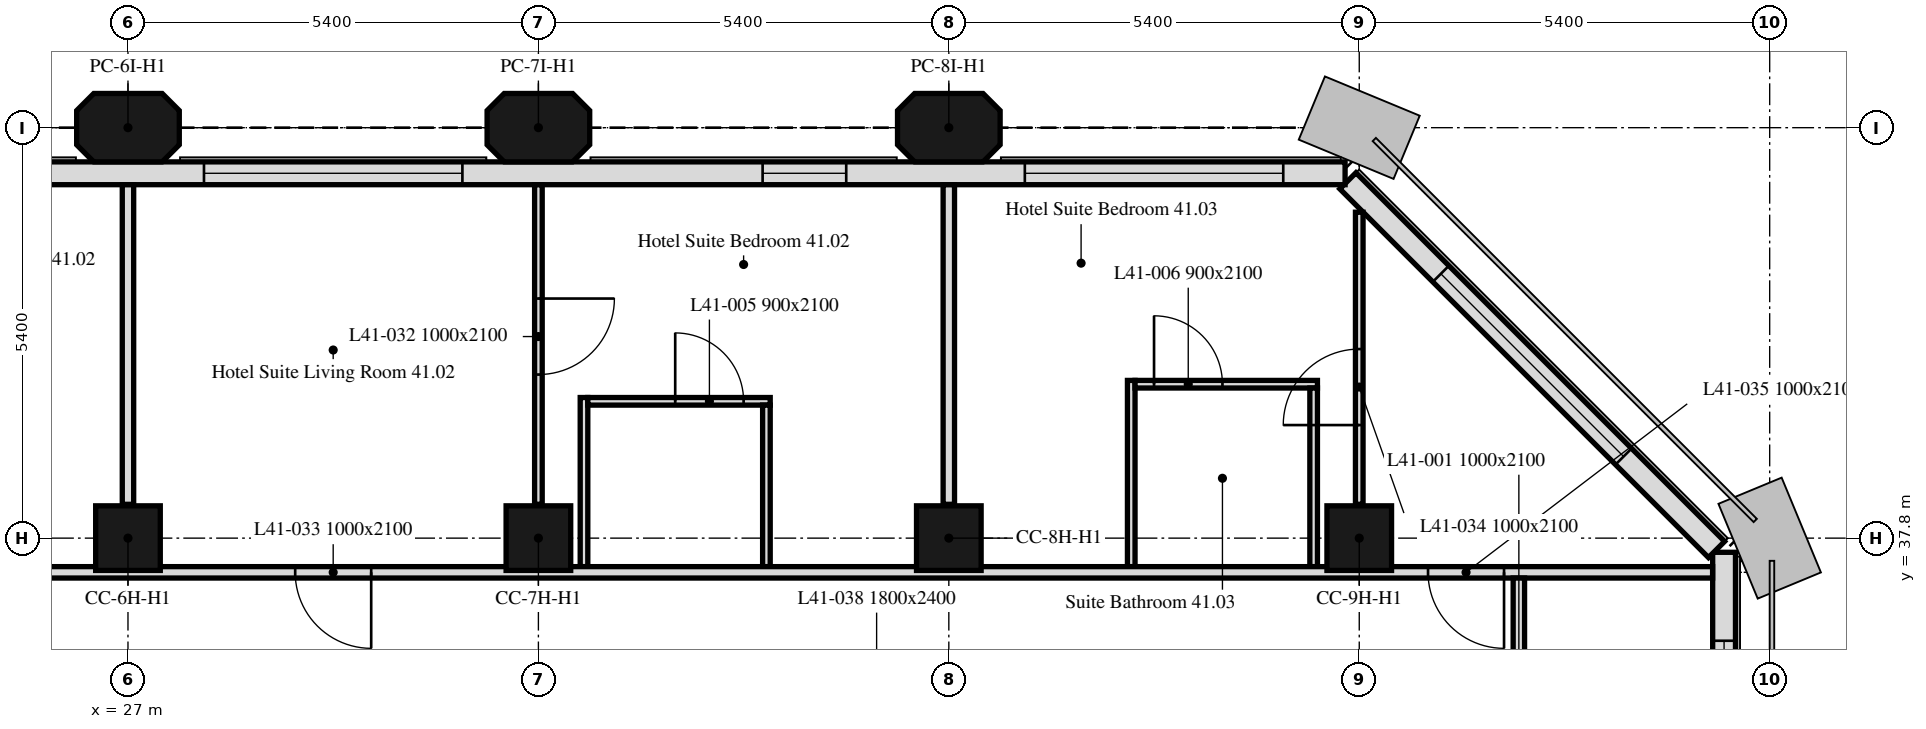
"""IFC4 building model, lengths in metres.
Left out: names, types, materials, properties, quantities, classifications, styles, units other than length and angle.
Written with IfcOpenShell. Run it as: python <this file> out.ifc"""

import sys

from ifc_helpers import new_model, si_unit, direction, frame, frame_2d, origin, origin_2d, place, context, subcontext, project, spatial, polyline, rectangle, outline, extrude, element, fill, save


model = new_model("IFC4")
c1 = context("Model", 3, precision=1e-05, world=origin(), true_north=direction((0.0, 1.0)))
c2 = subcontext(c1, "Body", "Model", "MODEL_VIEW")
j1 = project(units=[si_unit("LENGTHUNIT", "METRE"), si_unit("PLANEANGLEUNIT", "RADIAN")], contexts=[c1])
p1 = place(None, origin())
s1 = spatial("IfcSite", under=j1, at=p1, CompositionType="ELEMENT")
p2 = place(p1, origin())
s2 = spatial("IfcBuilding", under=s1, at=p2, CompositionType="ELEMENT")
p3 = place(p2, frame((0.0, 0.0, 172.6)))
s3 = spatial("IfcBuildingStorey", under=s2, at=p3, CompositionType="ELEMENT", Elevation=172.6)
for number, where, z_axis, x_axis in (
    (1, (27.0, 37.8, 0.0), (0.0, 0.0, 1.0), (1.0, 0.0, 0.0)),
    (2, (32.4, 37.8, 0.0), (0.0, 0.0, 1.0), (1.0, 0.0, 0.0)),
    (3, (37.8, 37.8, 0.0), (0.0, 0.0, 1.0), (1.0, 0.0, 0.0)),
    (4, (43.2, 37.8, 0.0), (0.0, 0.0, 1.0), (1.0, 0.0, 0.0)),
):
    element("IfcColumn", number, at=place(p3, frame(where, z_axis=z_axis, x_axis=x_axis)), inside=s3, PredefinedType="COLUMN", context=c2, shape_type="SweptSolid", body=[
        extrude(rectangle(XDim=0.85, YDim=0.85, at=origin_2d()), origin(), (0.0, 0.0, 1.0), 2.8),
    ])
for number, where, z_axis, x_axis in (
    (5, (27.0, 43.2, 0.0), (0.0, 0.0, 1.0), (1.0, 0.0, 0.0)),
    (6, (32.4, 43.2, 0.0), (0.0, 0.0, 1.0), (1.0, 0.0, 0.0)),
    (7, (37.8, 43.2, 0.0), (0.0, 0.0, 1.0), (1.0, 0.0, 0.0)),
):
    element("IfcColumn", number, at=place(p3, frame(where, z_axis=z_axis, x_axis=x_axis)), inside=s3, PredefinedType="COLUMN", context=c2, shape_type="SweptSolid", body=[
        extrude(outline(polyline([(-0.45, -0.45), (0.45, -0.45), (0.675, -0.225), (0.675, 0.225), (0.45, 0.45), (-0.45, 0.45), (-0.675, 0.225), (-0.675, -0.225), (-0.45, -0.45)])), origin(), (0.0, 0.0, 1.0), 2.8),
    ])
p4 = place(p3, frame((48.0, 5.586, 0.0), z_axis=(0.0, 0.0, 1.0), x_axis=(0.0, 1.0, 0.0)))
e8 = element("IfcWall", 8, at=p4, inside=s3, PredefinedType="SOLIDWALL", context=c2, shape_type="SweptSolid", body=[
    extrude(rectangle(XDim=32.027, YDim=0.3, at=frame_2d((16.014, 0.0))), origin(), (0.0, 0.0, 1.0), 2.8),
])
p5 = place(p4, frame((1.164, 0.0, 0.9)))
e9 = element("IfcOpeningElement", 9, at=p5, cuts=e8, PredefinedType="OPENING", context=c2, shape_type="SweptSolid", body=[
    extrude(rectangle(XDim=1.1, YDim=1.7, at=frame_2d((0.55, 0.85))), frame((0.0, 0.16, 0.0), z_axis=(0.0, -1.0, 0.0), x_axis=(1.0, 0.0, 0.0)), (0.0, 0.0, 1.0), 0.32),
])
p6 = place(p4, frame((2.764, 0.0, 0.9)))
e10 = element("IfcOpeningElement", 10, at=p6, cuts=e8, PredefinedType="OPENING", context=c2, shape_type="SweptSolid", body=[
    extrude(rectangle(XDim=1.1, YDim=1.7, at=frame_2d((0.55, 0.85))), frame((0.0, 0.16, 0.0), z_axis=(0.0, -1.0, 0.0), x_axis=(1.0, 0.0, 0.0)), (0.0, 0.0, 1.0), 0.32),
])
p7 = place(p4, frame((6.564, 0.0, 0.9)))
e11 = element("IfcOpeningElement", 11, at=p7, cuts=e8, PredefinedType="OPENING", context=c2, shape_type="SweptSolid", body=[
    extrude(rectangle(XDim=1.1, YDim=1.7, at=frame_2d((0.55, 0.85))), frame((0.0, 0.16, 0.0), z_axis=(0.0, -1.0, 0.0), x_axis=(1.0, 0.0, 0.0)), (0.0, 0.0, 1.0), 0.32),
])
p8 = place(p4, frame((8.164, 0.0, 0.9)))
e12 = element("IfcOpeningElement", 12, at=p8, cuts=e8, PredefinedType="OPENING", context=c2, shape_type="SweptSolid", body=[
    extrude(rectangle(XDim=1.1, YDim=1.7, at=frame_2d((0.55, 0.85))), frame((0.0, 0.16, 0.0), z_axis=(0.0, -1.0, 0.0), x_axis=(1.0, 0.0, 0.0)), (0.0, 0.0, 1.0), 0.32),
])
p9 = place(p4, frame((11.614, 0.0, 0.9)))
e13 = element("IfcOpeningElement", 13, at=p9, cuts=e8, PredefinedType="OPENING", context=c2, shape_type="SweptSolid", body=[
    extrude(rectangle(XDim=3.4, YDim=1.7, at=frame_2d((1.7, 0.85))), frame((0.0, 0.16, 0.0), z_axis=(0.0, -1.0, 0.0), x_axis=(1.0, 0.0, 0.0)), (0.0, 0.0, 1.0), 0.32),
])
p10 = place(p4, frame((17.364, 0.0, 0.9)))
e14 = element("IfcOpeningElement", 14, at=p10, cuts=e8, PredefinedType="OPENING", context=c2, shape_type="SweptSolid", body=[
    extrude(rectangle(XDim=1.1, YDim=1.7, at=frame_2d((0.55, 0.85))), frame((0.0, 0.16, 0.0), z_axis=(0.0, -1.0, 0.0), x_axis=(1.0, 0.0, 0.0)), (0.0, 0.0, 1.0), 0.32),
])
p11 = place(p4, frame((18.964, 0.0, 0.9)))
e15 = element("IfcOpeningElement", 15, at=p11, cuts=e8, PredefinedType="OPENING", context=c2, shape_type="SweptSolid", body=[
    extrude(rectangle(XDim=1.1, YDim=1.7, at=frame_2d((0.55, 0.85))), frame((0.0, 0.16, 0.0), z_axis=(0.0, -1.0, 0.0), x_axis=(1.0, 0.0, 0.0)), (0.0, 0.0, 1.0), 0.32),
])
p12 = place(p4, frame((22.414, 0.0, 0.9)))
e16 = element("IfcOpeningElement", 16, at=p12, cuts=e8, PredefinedType="OPENING", context=c2, shape_type="SweptSolid", body=[
    extrude(rectangle(XDim=3.4, YDim=1.7, at=frame_2d((1.7, 0.85))), frame((0.0, 0.16, 0.0), z_axis=(0.0, -1.0, 0.0), x_axis=(1.0, 0.0, 0.0)), (0.0, 0.0, 1.0), 0.32),
])
p13 = place(p4, frame((28.164, 0.0, 0.9)))
e17 = element("IfcOpeningElement", 17, at=p13, cuts=e8, PredefinedType="OPENING", context=c2, shape_type="SweptSolid", body=[
    extrude(rectangle(XDim=1.1, YDim=1.7, at=frame_2d((0.55, 0.85))), frame((0.0, 0.16, 0.0), z_axis=(0.0, -1.0, 0.0), x_axis=(1.0, 0.0, 0.0)), (0.0, 0.0, 1.0), 0.32),
])
p14 = place(p4, frame((29.764, 0.0, 0.9)))
e18 = element("IfcOpeningElement", 18, at=p14, cuts=e8, PredefinedType="OPENING", context=c2, shape_type="SweptSolid", body=[
    extrude(rectangle(XDim=1.1, YDim=1.7, at=frame_2d((0.55, 0.85))), frame((0.0, 0.16, 0.0), z_axis=(0.0, -1.0, 0.0), x_axis=(1.0, 0.0, 0.0)), (0.0, 0.0, 1.0), 0.32),
])
p15 = place(p3, frame((47.901, 37.65, 0.0), z_axis=(0.0, 0.0, 1.0), x_axis=(-0.707106781187, 0.707106781187, 0.0)))
e19 = element("IfcWall", 19, at=p15, inside=s3, PredefinedType="SOLIDWALL", context=c2, shape_type="SweptSolid", body=[
    extrude(rectangle(XDim=6.86, YDim=0.3, at=frame_2d((3.43, 0.0))), origin(), (0.0, 0.0, 1.0), 2.8),
])
p16 = place(p15, frame((1.73, 0.0, 0.9)))
e20 = element("IfcOpeningElement", 20, at=p16, cuts=e19, PredefinedType="OPENING", context=c2, shape_type="SweptSolid", body=[
    extrude(rectangle(XDim=3.4, YDim=1.7, at=frame_2d((1.7, 0.85))), frame((0.0, 0.16, 0.0), z_axis=(0.0, -1.0, 0.0), x_axis=(1.0, 0.0, 0.0)), (0.0, 0.0, 1.0), 0.32),
])
p17 = place(p3, frame((43.014, 42.6, 0.0), z_axis=(0.0, 0.0, 1.0), x_axis=(-1.0, 0.0, 0.0)))
e21 = element("IfcWall", 21, at=p17, inside=s3, PredefinedType="SOLIDWALL", context=c2, shape_type="SweptSolid", body=[
    extrude(rectangle(XDim=32.027, YDim=0.3, at=frame_2d((16.014, 0.0))), origin(), (0.0, 0.0, 1.0), 2.8),
])
p18 = place(p17, frame((0.814, 0.0, 0.9)))
e22 = element("IfcOpeningElement", 22, at=p18, cuts=e21, PredefinedType="OPENING", context=c2, shape_type="SweptSolid", body=[
    extrude(rectangle(XDim=3.4, YDim=1.7, at=frame_2d((1.7, 0.85))), frame((0.0, 0.16, 0.0), z_axis=(0.0, -1.0, 0.0), x_axis=(1.0, 0.0, 0.0)), (0.0, 0.0, 1.0), 0.32),
])
p19 = place(p17, frame((6.564, 0.0, 0.9)))
e23 = element("IfcOpeningElement", 23, at=p19, cuts=e21, PredefinedType="OPENING", context=c2, shape_type="SweptSolid", body=[
    extrude(rectangle(XDim=1.1, YDim=1.7, at=frame_2d((0.55, 0.85))), frame((0.0, 0.16, 0.0), z_axis=(0.0, -1.0, 0.0), x_axis=(1.0, 0.0, 0.0)), (0.0, 0.0, 1.0), 0.32),
])
p20 = place(p17, frame((11.614, 0.0, 0.9)))
e24 = element("IfcOpeningElement", 24, at=p20, cuts=e21, PredefinedType="OPENING", context=c2, shape_type="SweptSolid", body=[
    extrude(rectangle(XDim=3.4, YDim=1.7, at=frame_2d((1.7, 0.85))), frame((0.0, 0.16, 0.0), z_axis=(0.0, -1.0, 0.0), x_axis=(1.0, 0.0, 0.0)), (0.0, 0.0, 1.0), 0.32),
])
p21 = place(p17, frame((17.364, 0.0, 0.9)))
e25 = element("IfcOpeningElement", 25, at=p21, cuts=e21, PredefinedType="OPENING", context=c2, shape_type="SweptSolid", body=[
    extrude(rectangle(XDim=1.1, YDim=1.7, at=frame_2d((0.55, 0.85))), frame((0.0, 0.16, 0.0), z_axis=(0.0, -1.0, 0.0), x_axis=(1.0, 0.0, 0.0)), (0.0, 0.0, 1.0), 0.32),
])
p22 = place(p17, frame((22.414, 0.0, 0.9)))
e26 = element("IfcOpeningElement", 26, at=p22, cuts=e21, PredefinedType="OPENING", context=c2, shape_type="SweptSolid", body=[
    extrude(rectangle(XDim=3.4, YDim=1.7, at=frame_2d((1.7, 0.85))), frame((0.0, 0.16, 0.0), z_axis=(0.0, -1.0, 0.0), x_axis=(1.0, 0.0, 0.0)), (0.0, 0.0, 1.0), 0.32),
])
p23 = place(p17, frame((28.164, 0.0, 0.9)))
e27 = element("IfcOpeningElement", 27, at=p23, cuts=e21, PredefinedType="OPENING", context=c2, shape_type="SweptSolid", body=[
    extrude(rectangle(XDim=1.1, YDim=1.7, at=frame_2d((0.55, 0.85))), frame((0.0, 0.16, 0.0), z_axis=(0.0, -1.0, 0.0), x_axis=(1.0, 0.0, 0.0)), (0.0, 0.0, 1.0), 0.32),
])
p24 = place(p3, frame((27.0, 38.245, 0.0), z_axis=(0.0, 0.0, 1.0), x_axis=(0.0, 1.0, 0.0)))
e28 = element("IfcWall", 28, at=p24, inside=s3, PredefinedType="PARTITIONING", context=c2, shape_type="SweptSolid", body=[
    extrude(rectangle(XDim=4.204, YDim=0.15, at=frame_2d((2.102, 0.0))), origin(), (0.0, 0.0, 1.0), 2.8),
])
p25 = place(p3, frame((32.4, 42.449, 0.0), z_axis=(0.0, 0.0, 1.0), x_axis=(0.0, -1.0, 0.0)))
e29 = element("IfcWall", 29, at=p25, inside=s3, PredefinedType="PARTITIONING", context=c2, shape_type="SweptSolid", body=[
    extrude(rectangle(XDim=4.204, YDim=0.1, at=frame_2d((2.102, 0.0))), origin(), (0.0, 0.0, 1.0), 2.8),
])
p26 = place(p25, frame((1.497, 0.0, 0.0)))
e30 = element("IfcOpeningElement", 30, at=p26, cuts=e29, PredefinedType="OPENING", context=c2, shape_type="SweptSolid", body=[
    extrude(rectangle(XDim=1.0, YDim=2.1, at=frame_2d((0.5, 1.05))), frame((0.0, 0.05, 0.0), z_axis=(0.0, -1.0, 0.0), x_axis=(1.0, 0.0, 0.0)), (0.0, 0.0, 1.0), 0.1),
])
p27 = place(p3, frame((33.0, 37.425, 0.0), z_axis=(0.0, 0.0, 1.0), x_axis=(0.0, 1.0, 0.0)))
e31 = element("IfcWall", 31, at=p27, inside=s3, PredefinedType="PARTITIONING", context=c2, shape_type="SweptSolid", body=[
    extrude(rectangle(XDim=2.225, YDim=0.1, at=frame_2d((1.112, 0.0))), origin(), (0.0, 0.0, 1.0), 2.8),
])
p28 = place(p3, frame((33.05, 39.6, 0.0), z_axis=(0.0, 0.0, 1.0), x_axis=(1.0, 0.0, 0.0)))
e32 = element("IfcWall", 32, at=p28, inside=s3, PredefinedType="PARTITIONING", context=c2, shape_type="SweptSolid", body=[
    extrude(rectangle(XDim=2.4, YDim=0.1, at=frame_2d((1.2, 0.0))), origin(), (0.0, 0.0, 1.0), 2.8),
])
p29 = place(p28, frame((1.15, 0.0, 0.0)))
e33 = element("IfcOpeningElement", 33, at=p29, cuts=e32, PredefinedType="OPENING", context=c2, shape_type="SweptSolid", body=[
    extrude(rectangle(XDim=0.9, YDim=2.1, at=frame_2d((0.45, 1.05))), frame((0.0, 0.05, 0.0), z_axis=(0.0, -1.0, 0.0), x_axis=(1.0, 0.0, 0.0)), (0.0, 0.0, 1.0), 0.1),
])
p30 = place(p3, frame((35.4, 39.55, 0.0), z_axis=(0.0, 0.0, 1.0), x_axis=(0.0, -1.0, 0.0)))
e34 = element("IfcWall", 34, at=p30, inside=s3, PredefinedType="PARTITIONING", context=c2, shape_type="SweptSolid", body=[
    extrude(rectangle(XDim=2.125, YDim=0.1, at=frame_2d((1.062, 0.0))), origin(), (0.0, 0.0, 1.0), 2.8),
])
p31 = place(p3, frame((37.8, 38.245, 0.0), z_axis=(0.0, 0.0, 1.0), x_axis=(0.0, 1.0, 0.0)))
e35 = element("IfcWall", 35, at=p31, inside=s3, PredefinedType="PARTITIONING", context=c2, shape_type="SweptSolid", body=[
    extrude(rectangle(XDim=4.204, YDim=0.15, at=frame_2d((2.102, 0.0))), origin(), (0.0, 0.0, 1.0), 2.8),
])
p32 = place(p3, frame((40.2, 37.425, 0.0), z_axis=(0.0, 0.0, 1.0), x_axis=(0.0, 1.0, 0.0)))
e36 = element("IfcWall", 36, at=p32, inside=s3, PredefinedType="PARTITIONING", context=c2, shape_type="SweptSolid", body=[
    extrude(rectangle(XDim=2.45, YDim=0.1, at=frame_2d((1.225, 0.0))), origin(), (0.0, 0.0, 1.0), 2.8),
])
p33 = place(p3, frame((40.25, 39.825, 0.0), z_axis=(0.0, 0.0, 1.0), x_axis=(1.0, 0.0, 0.0)))
e37 = element("IfcWall", 37, at=p33, inside=s3, PredefinedType="PARTITIONING", context=c2, shape_type="SweptSolid", body=[
    extrude(rectangle(XDim=2.4, YDim=0.1, at=frame_2d((1.2, 0.0))), origin(), (0.0, 0.0, 1.0), 2.8),
])
p34 = place(p33, frame((0.25, 0.0, 0.0)))
e38 = element("IfcOpeningElement", 38, at=p34, cuts=e37, PredefinedType="OPENING", context=c2, shape_type="SweptSolid", body=[
    extrude(rectangle(XDim=0.9, YDim=2.1, at=frame_2d((0.45, 1.05))), frame((0.0, 0.05, 0.0), z_axis=(0.0, -1.0, 0.0), x_axis=(1.0, 0.0, 0.0)), (0.0, 0.0, 1.0), 0.1),
])
p35 = place(p3, frame((42.6, 39.775, 0.0), z_axis=(0.0, 0.0, 1.0), x_axis=(0.0, -1.0, 0.0)))
e39 = element("IfcWall", 39, at=p35, inside=s3, PredefinedType="PARTITIONING", context=c2, shape_type="SweptSolid", body=[
    extrude(rectangle(XDim=2.35, YDim=0.1, at=frame_2d((1.175, 0.0))), origin(), (0.0, 0.0, 1.0), 2.8),
])
p36 = place(p3, frame((43.2, 38.245, 0.0), z_axis=(0.0, 0.0, 1.0), x_axis=(0.0, 1.0, 0.0)))
e40 = element("IfcWall", 40, at=p36, inside=s3, PredefinedType="PARTITIONING", context=c2, shape_type="SweptSolid", body=[
    extrude(rectangle(XDim=3.843, YDim=0.1, at=frame_2d((1.921, 0.0))), origin(), (0.0, 0.0, 1.0), 2.8),
])
p37 = place(p36, frame((1.042, 0.0, 0.0)))
e41 = element("IfcOpeningElement", 41, at=p37, cuts=e40, PredefinedType="OPENING", context=c2, shape_type="SweptSolid", body=[
    extrude(rectangle(XDim=1.0, YDim=2.1, at=frame_2d((0.5, 1.05))), frame((0.0, 0.05, 0.0), z_axis=(0.0, -1.0, 0.0), x_axis=(1.0, 0.0, 0.0)), (0.0, 0.0, 1.0), 0.1),
])
p38 = place(p3, frame((47.849, 37.35, 0.0), z_axis=(0.0, 0.0, 1.0), x_axis=(-1.0, 0.0, 0.0)))
e42 = element("IfcWall", 42, at=p38, inside=s3, PredefinedType="PARTITIONING", context=c2, shape_type="SweptSolid", body=[
    extrude(rectangle(XDim=41.698, YDim=0.15, at=frame_2d((20.849, 0.0))), origin(), (0.0, 0.0, 1.0), 2.8),
])
p39 = place(p38, frame((39.249, 0.0, 0.0)))
e43 = element("IfcOpeningElement", 43, at=p39, cuts=e42, PredefinedType="OPENING", context=c2, shape_type="SweptSolid", body=[
    extrude(rectangle(XDim=1.0, YDim=2.1, at=frame_2d((0.5, 1.05))), frame((0.0, 0.075, 0.0), z_axis=(0.0, -1.0, 0.0), x_axis=(1.0, 0.0, 0.0)), (0.0, 0.0, 1.0), 0.15),
])
p40 = place(p38, frame((27.649, 0.0, 0.0)))
e44 = element("IfcOpeningElement", 44, at=p40, cuts=e42, PredefinedType="OPENING", context=c2, shape_type="SweptSolid", body=[
    extrude(rectangle(XDim=1.0, YDim=2.1, at=frame_2d((0.5, 1.05))), frame((0.0, 0.075, 0.0), z_axis=(0.0, -1.0, 0.0), x_axis=(1.0, 0.0, 0.0)), (0.0, 0.0, 1.0), 0.15),
])
p41 = place(p38, frame((22.249, 0.0, 0.0)))
e45 = element("IfcOpeningElement", 45, at=p41, cuts=e42, PredefinedType="OPENING", context=c2, shape_type="SweptSolid", body=[
    extrude(rectangle(XDim=1.0, YDim=2.1, at=frame_2d((0.5, 1.05))), frame((0.0, 0.075, 0.0), z_axis=(0.0, -1.0, 0.0), x_axis=(1.0, 0.0, 0.0)), (0.0, 0.0, 1.0), 0.15),
])
p42 = place(p38, frame((17.649, 0.0, 0.0)))
e46 = element("IfcOpeningElement", 46, at=p42, cuts=e42, PredefinedType="OPENING", context=c2, shape_type="SweptSolid", body=[
    extrude(rectangle(XDim=1.0, YDim=2.1, at=frame_2d((0.5, 1.05))), frame((0.0, 0.075, 0.0), z_axis=(0.0, -1.0, 0.0), x_axis=(1.0, 0.0, 0.0)), (0.0, 0.0, 1.0), 0.15),
])
p43 = place(p38, frame((2.744, 0.0, 0.0)))
e47 = element("IfcOpeningElement", 47, at=p43, cuts=e42, PredefinedType="OPENING", context=c2, shape_type="SweptSolid", body=[
    extrude(rectangle(XDim=1.0, YDim=2.1, at=frame_2d((0.5, 1.05))), frame((0.0, 0.075, 0.0), z_axis=(0.0, -1.0, 0.0), x_axis=(1.0, 0.0, 0.0)), (0.0, 0.0, 1.0), 0.15),
])
p44 = place(p3, frame((45.3, 37.275, 0.0), z_axis=(0.0, 0.0, 1.0), x_axis=(0.0, -1.0, 0.0)))
e48 = element("IfcWall", 48, at=p44, inside=s3, PredefinedType="PARTITIONING", context=c2, shape_type="SweptSolid", body=[
    extrude(rectangle(XDim=15.6, YDim=0.15, at=frame_2d((7.8, 0.0))), origin(), (0.0, 0.0, 1.0), 2.2),
])
p45 = place(p44, frame((1.9, 0.0, 0.0)))
e49 = element("IfcOpeningElement", 49, at=p45, cuts=e48, PredefinedType="OPENING", context=c2, shape_type="SweptSolid", body=[
    extrude(rectangle(XDim=1.0, YDim=2.1, at=frame_2d((0.5, 1.05))), frame((0.0, 0.075, 0.0), z_axis=(0.0, -1.0, 0.0), x_axis=(1.0, 0.0, 0.0)), (0.0, 0.0, 1.0), 0.15),
])
p46 = place(p44, frame((8.425, 0.0, 0.0)))
e50 = element("IfcOpeningElement", 50, at=p46, cuts=e48, PredefinedType="OPENING", context=c2, shape_type="SweptSolid", body=[
    extrude(rectangle(XDim=1.0, YDim=2.1, at=frame_2d((0.5, 1.05))), frame((0.0, 0.075, 0.0), z_axis=(0.0, -1.0, 0.0), x_axis=(1.0, 0.0, 0.0)), (0.0, 0.0, 1.0), 0.15),
])
p47 = place(p14, origin())
e51 = element("IfcWindow", 51, at=p47, inside=s3, PartitioningType="SINGLE_PANEL", PredefinedType="WINDOW", context=c2, shape_type="SweptSolid", body=[
    extrude(rectangle(XDim=1.1, YDim=1.7, at=frame_2d((0.55, 0.85))), frame((0.0, 0.03, 0.0), z_axis=(0.0, -1.0, 0.0), x_axis=(1.0, 0.0, 0.0)), (0.0, 0.0, 1.0), 0.06),
])
fill(e18, e51)
p48 = place(p16, origin())
e52 = element("IfcWindow", 52, at=p48, inside=s3, PartitioningType="SINGLE_PANEL", PredefinedType="WINDOW", context=c2, shape_type="SweptSolid", body=[
    extrude(rectangle(XDim=3.4, YDim=1.7, at=frame_2d((1.7, 0.85))), frame((0.0, 0.03, 0.0), z_axis=(0.0, -1.0, 0.0), x_axis=(1.0, 0.0, 0.0)), (0.0, 0.0, 1.0), 0.06),
])
fill(e20, e52)
p49 = place(p18, origin())
e53 = element("IfcWindow", 53, at=p49, inside=s3, PartitioningType="SINGLE_PANEL", PredefinedType="WINDOW", context=c2, shape_type="SweptSolid", body=[
    extrude(rectangle(XDim=3.4, YDim=1.7, at=frame_2d((1.7, 0.85))), frame((0.0, 0.03, 0.0), z_axis=(0.0, -1.0, 0.0), x_axis=(1.0, 0.0, 0.0)), (0.0, 0.0, 1.0), 0.06),
])
fill(e22, e53)
p50 = place(p19, origin())
e54 = element("IfcWindow", 54, at=p50, inside=s3, PartitioningType="SINGLE_PANEL", PredefinedType="WINDOW", context=c2, shape_type="SweptSolid", body=[
    extrude(rectangle(XDim=1.1, YDim=1.7, at=frame_2d((0.55, 0.85))), frame((0.0, 0.03, 0.0), z_axis=(0.0, -1.0, 0.0), x_axis=(1.0, 0.0, 0.0)), (0.0, 0.0, 1.0), 0.06),
])
fill(e23, e54)
p51 = place(p20, origin())
e55 = element("IfcWindow", 55, at=p51, inside=s3, PartitioningType="SINGLE_PANEL", PredefinedType="WINDOW", context=c2, shape_type="SweptSolid", body=[
    extrude(rectangle(XDim=3.4, YDim=1.7, at=frame_2d((1.7, 0.85))), frame((0.0, 0.03, 0.0), z_axis=(0.0, -1.0, 0.0), x_axis=(1.0, 0.0, 0.0)), (0.0, 0.0, 1.0), 0.06),
])
fill(e24, e55)
p52 = place(p29, origin())
e56 = element("IfcDoor", 56, at=p52, inside=s3, OperationType="SINGLE_SWING_RIGHT", PredefinedType="DOOR", context=c2, shape_type="SweptSolid", body=[
    extrude(rectangle(XDim=0.9, YDim=2.1, at=frame_2d((0.45, 1.05))), frame((0.0, 0.025, 0.0), z_axis=(0.0, -1.0, 0.0), x_axis=(1.0, 0.0, 0.0)), (0.0, 0.0, 1.0), 0.05),
])
fill(e33, e56)
p53 = place(p34, origin())
e57 = element("IfcDoor", 57, at=p53, inside=s3, OperationType="SINGLE_SWING_LEFT", PredefinedType="DOOR", context=c2, shape_type="SweptSolid", body=[
    extrude(rectangle(XDim=0.9, YDim=2.1, at=frame_2d((0.45, 1.05))), frame((0.0, 0.025, 0.0), z_axis=(0.0, -1.0, 0.0), x_axis=(1.0, 0.0, 0.0)), (0.0, 0.0, 1.0), 0.05),
])
fill(e38, e57)
p54 = place(p26, origin())
e58 = element("IfcDoor", 58, at=p54, inside=s3, OperationType="SINGLE_SWING_RIGHT", PredefinedType="DOOR", context=c2, shape_type="SweptSolid", body=[
    extrude(rectangle(XDim=1.0, YDim=2.1, at=frame_2d((0.5, 1.05))), frame((0.0, 0.025, 0.0), z_axis=(0.0, -1.0, 0.0), x_axis=(1.0, 0.0, 0.0)), (0.0, 0.0, 1.0), 0.05),
])
fill(e30, e58)
p55 = place(p42, origin())
e59 = element("IfcDoor", 59, at=p55, inside=s3, OperationType="SINGLE_SWING_RIGHT", PredefinedType="DOOR", context=c2, shape_type="SweptSolid", body=[
    extrude(rectangle(XDim=1.0, YDim=2.1, at=frame_2d((0.5, 1.05))), frame((0.0, 0.025, 0.0), z_axis=(0.0, -1.0, 0.0), x_axis=(1.0, 0.0, 0.0)), (0.0, 0.0, 1.0), 0.05),
])
fill(e46, e59)
p56 = place(p37, origin())
e60 = element("IfcDoor", 60, at=p56, inside=s3, OperationType="SINGLE_SWING_LEFT", PredefinedType="DOOR", context=c2, shape_type="SweptSolid", body=[
    extrude(rectangle(XDim=1.0, YDim=2.1, at=frame_2d((0.5, 1.05))), frame((0.0, 0.025, 0.0), z_axis=(0.0, -1.0, 0.0), x_axis=(1.0, 0.0, 0.0)), (0.0, 0.0, 1.0), 0.05),
])
fill(e41, e60)
p57 = place(p43, origin())
e61 = element("IfcDoor", 61, at=p57, inside=s3, OperationType="SINGLE_SWING_RIGHT", PredefinedType="DOOR", context=c2, shape_type="SweptSolid", body=[
    extrude(rectangle(XDim=1.0, YDim=2.1, at=frame_2d((0.5, 1.05))), frame((0.0, 0.025, 0.0), z_axis=(0.0, -1.0, 0.0), x_axis=(1.0, 0.0, 0.0)), (0.0, 0.0, 1.0), 0.05),
])
fill(e47, e61)
save(model, sys.argv[1])
